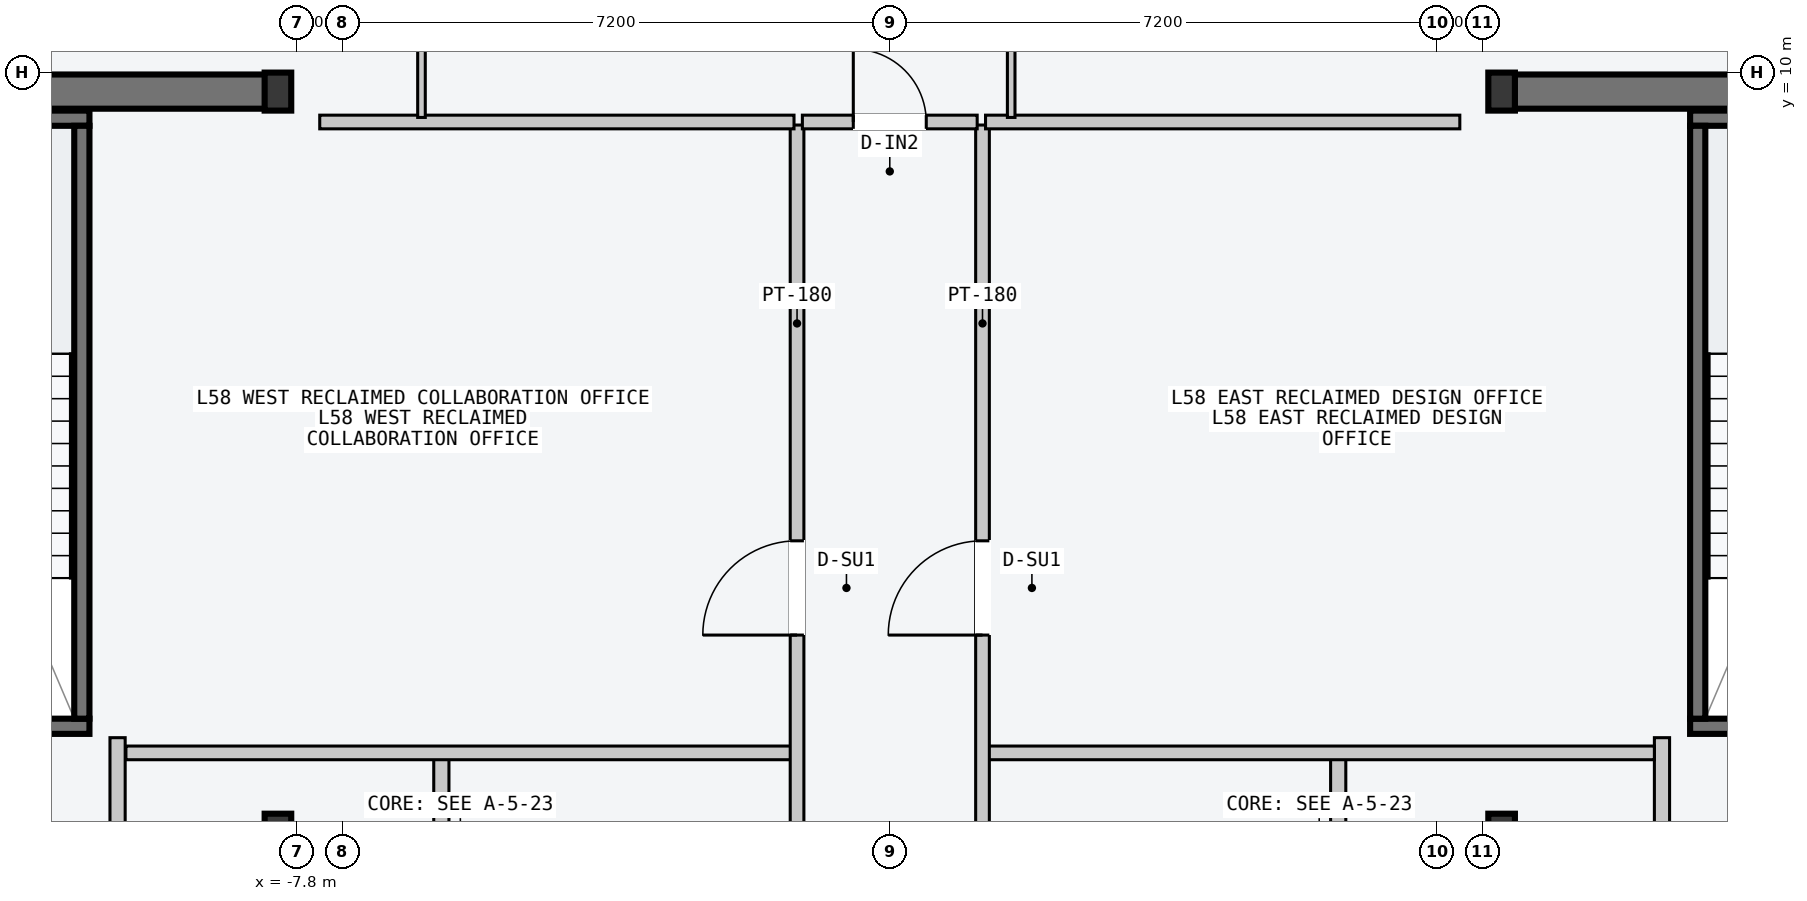
"""IFC4 building model, lengths in metres.
Left out: names, types, materials, properties, quantities, classifications, styles, units other than length and angle.
Written with IfcOpenShell. Run it as: python <this file> out.ifc"""

import sys

from ifc_helpers import new_model, si_unit, direction, frame, frame_2d, origin, origin_2d, place, context, subcontext, project, spatial, rectangle, i_section, extrude, element, fill, save


model = new_model("IFC4")
c1 = context("Model", 3, precision=1e-05, world=origin(), true_north=direction((0.0, 1.0)))
c2 = subcontext(c1, "Body", "Model", "MODEL_VIEW")
j1 = project(units=[si_unit("LENGTHUNIT", "METRE"), si_unit("PLANEANGLEUNIT", "RADIAN")], contexts=[c1])
p1 = place(None, origin())
s1 = spatial("IfcSite", under=j1, at=p1, CompositionType="ELEMENT")
p2 = place(p1, origin())
s2 = spatial("IfcBuilding", under=s1, at=p2, CompositionType="ELEMENT")
p3 = place(p2, frame((0.0, 0.0, 222.0)))
s3 = spatial("IfcBuildingStorey", under=s2, at=p3, CompositionType="ELEMENT", Elevation=222.0)
for number, where, z_axis, x_axis in (
    (1, (-14.53, 9.75, -0.2), (0.0, 0.0, 1.0), (1.0, 0.0, 0.0)),
    (2, (8.07, 9.75, -0.2), (0.0, 0.0, 1.0), (1.0, 0.0, 0.0)),
):
    element("IfcWall", number, at=place(p3, frame(where, z_axis=z_axis, x_axis=x_axis)), inside=s3, PredefinedType="SHEAR", context=c2, shape_type="SweptSolid", body=[
        extrude(rectangle(XDim=6.46, YDim=0.45, at=frame_2d((3.23, 0.0))), origin(), (0.0, 0.0, 1.0), 3.6),
    ])
p4 = place(p3, frame((-14.25, 1.4, -0.2), z_axis=(0.0, 0.0, 1.0), x_axis=(1.0, 0.0, 0.0)))
e3 = element("IfcWall", 3, at=p4, inside=s3, PredefinedType="SOLIDWALL", context=c2, shape_type="SweptSolid", body=[
    extrude(rectangle(XDim=3.72, YDim=0.2, at=frame_2d((1.86, 0.0))), origin(), (0.0, 0.0, 1.0), 3.6),
])
p5 = place(p4, frame((1.5, 0.0, 0.2)))
e4 = element("IfcOpeningElement", 4, at=p5, cuts=e3, PredefinedType="OPENING", context=c2, shape_type="SweptSolid", body=[
    extrude(rectangle(XDim=1.12, YDim=2.18, at=frame_2d((0.56, 1.09))), frame((0.0, 0.11, 0.0), z_axis=(0.0, -1.0, 0.0), x_axis=(1.0, 0.0, 0.0)), (0.0, 0.0, 1.0), 0.22),
])
p6 = place(p3, frame((-14.25, 9.4, -0.2), z_axis=(0.0, 0.0, 1.0), x_axis=(1.0, 0.0, 0.0)))
e5 = element("IfcWall", 5, at=p6, inside=s3, PredefinedType="SOLIDWALL", context=c2, shape_type="SweptSolid", body=[
    extrude(rectangle(XDim=3.72, YDim=0.2, at=frame_2d((1.86, 0.0))), origin(), (0.0, 0.0, 1.0), 3.6),
])
p7 = place(p3, frame((-10.63, 1.5, -0.2), z_axis=(0.0, 0.0, 1.0), x_axis=(0.0, 1.0, 0.0)))
e6 = element("IfcWall", 6, at=p7, inside=s3, PredefinedType="SOLIDWALL", context=c2, shape_type="SweptSolid", body=[
    extrude(rectangle(XDim=7.8, YDim=0.2, at=frame_2d((3.9, 0.0))), origin(), (0.0, 0.0, 1.0), 3.6),
])
p8 = place(p3, frame((10.53, 1.4, -0.2), z_axis=(0.0, 0.0, 1.0), x_axis=(1.0, 0.0, 0.0)))
e7 = element("IfcWall", 7, at=p8, inside=s3, PredefinedType="SOLIDWALL", context=c2, shape_type="SweptSolid", body=[
    extrude(rectangle(XDim=3.72, YDim=0.2, at=frame_2d((1.86, 0.0))), origin(), (0.0, 0.0, 1.0), 3.6),
])
p9 = place(p8, frame((1.5, 0.0, 0.2)))
e8 = element("IfcOpeningElement", 8, at=p9, cuts=e7, PredefinedType="OPENING", context=c2, shape_type="SweptSolid", body=[
    extrude(rectangle(XDim=1.12, YDim=2.18, at=frame_2d((0.56, 1.09))), frame((0.0, 0.11, 0.0), z_axis=(0.0, -1.0, 0.0), x_axis=(1.0, 0.0, 0.0)), (0.0, 0.0, 1.0), 0.22),
])
p10 = place(p3, frame((10.53, 9.4, -0.2), z_axis=(0.0, 0.0, 1.0), x_axis=(1.0, 0.0, 0.0)))
e9 = element("IfcWall", 9, at=p10, inside=s3, PredefinedType="SOLIDWALL", context=c2, shape_type="SweptSolid", body=[
    extrude(rectangle(XDim=3.72, YDim=0.2, at=frame_2d((1.86, 0.0))), origin(), (0.0, 0.0, 1.0), 3.6),
])
p11 = place(p3, frame((10.63, 1.5, -0.2), z_axis=(0.0, 0.0, 1.0), x_axis=(0.0, 1.0, 0.0)))
e10 = element("IfcWall", 10, at=p11, inside=s3, PredefinedType="SOLIDWALL", context=c2, shape_type="SweptSolid", body=[
    extrude(rectangle(XDim=7.8, YDim=0.2, at=frame_2d((3.9, 0.0))), origin(), (0.0, 0.0, 1.0), 3.6),
])
for number, where, z_axis, x_axis in (
    (11, (-8.05, 0.0, 0.0), (0.0, 0.0, 1.0), (1.0, 0.0, 0.0)),
    (12, (-8.05, 9.75, 0.0), (0.0, 0.0, 1.0), (1.0, 0.0, 0.0)),
    (13, (8.05, 0.0, 0.0), (0.0, 0.0, 1.0), (1.0, 0.0, 0.0)),
    (14, (8.05, 9.75, 0.0), (0.0, 0.0, 1.0), (1.0, 0.0, 0.0)),
):
    element("IfcColumn", number, at=place(p3, frame(where, z_axis=z_axis, x_axis=x_axis)), inside=s3, PredefinedType="COLUMN", context=c2, shape_type="SweptSolid", body=[
        extrude(i_section(OverallWidth=0.35, OverallDepth=0.5, WebThickness=0.02, FlangeThickness=0.032, at=origin_2d()), origin(), (0.0, 0.0, 1.0), 3.6),
    ])
p12 = place(p3, frame((-5.9, -9.45, 0.0), z_axis=(0.0, 0.0, 1.0), x_axis=(0.0, 1.0, 0.0)))
e15 = element("IfcWall", 15, at=p12, inside=s3, PredefinedType="PARTITIONING", context=c2, shape_type="SweptSolid", body=[
    extrude(rectangle(XDim=10.5, YDim=0.2, at=frame_2d((5.25, 0.0))), origin(), (0.0, 0.0, 1.0), 3.4),
])
p13 = place(p12, frame((3.9, 0.0, 0.0)))
e16 = element("IfcOpeningElement", 16, at=p13, cuts=e15, PredefinedType="OPENING", context=c2, shape_type="SweptSolid", body=[
    extrude(rectangle(XDim=1.5, YDim=2.2, at=frame_2d((0.75, 1.1))), frame((0.0, 0.11, 0.0), z_axis=(0.0, -1.0, 0.0), x_axis=(1.0, 0.0, 0.0)), (0.0, 0.0, 1.0), 0.22),
])
p14 = place(p3, frame((-10.16, -2.55, 0.0), z_axis=(0.0, 0.0, 1.0), x_axis=(0.0, 1.0, 0.0)))
e17 = element("IfcWall", 17, at=p14, inside=s3, PredefinedType="PARTITIONING", context=c2, shape_type="SweptSolid", body=[
    extrude(rectangle(XDim=3.8, YDim=0.2, at=frame_2d((1.9, 0.0))), origin(), (0.0, 0.0, 1.0), 3.4),
])
p15 = place(p14, frame((1.3, 0.0, 0.0)))
e18 = element("IfcOpeningElement", 18, at=p15, cuts=e17, PredefinedType="OPENING", context=c2, shape_type="SweptSolid", body=[
    extrude(rectangle(XDim=1.1, YDim=2.15, at=frame_2d((0.55, 1.075))), frame((0.0, 0.11, 0.0), z_axis=(0.0, -1.0, 0.0), x_axis=(1.0, 0.0, 0.0)), (0.0, 0.0, 1.0), 0.22),
])
p16 = place(p3, frame((5.9, -9.45, 0.0), z_axis=(0.0, 0.0, 1.0), x_axis=(0.0, 1.0, 0.0)))
e19 = element("IfcWall", 19, at=p16, inside=s3, PredefinedType="PARTITIONING", context=c2, shape_type="SweptSolid", body=[
    extrude(rectangle(XDim=10.5, YDim=0.2, at=frame_2d((5.25, 0.0))), origin(), (0.0, 0.0, 1.0), 3.4),
])
p17 = place(p16, frame((3.9, 0.0, 0.0)))
e20 = element("IfcOpeningElement", 20, at=p17, cuts=e19, PredefinedType="OPENING", context=c2, shape_type="SweptSolid", body=[
    extrude(rectangle(XDim=1.5, YDim=2.2, at=frame_2d((0.75, 1.1))), frame((0.0, 0.11, 0.0), z_axis=(0.0, -1.0, 0.0), x_axis=(1.0, 0.0, 0.0)), (0.0, 0.0, 1.0), 0.22),
])
p18 = place(p3, frame((10.16, -2.55, 0.0), z_axis=(0.0, 0.0, 1.0), x_axis=(0.0, 1.0, 0.0)))
e21 = element("IfcWall", 21, at=p18, inside=s3, PredefinedType="PARTITIONING", context=c2, shape_type="SweptSolid", body=[
    extrude(rectangle(XDim=3.8, YDim=0.2, at=frame_2d((1.9, 0.0))), origin(), (0.0, 0.0, 1.0), 3.4),
])
p19 = place(p18, frame((1.3, 0.0, 0.0)))
e22 = element("IfcOpeningElement", 22, at=p19, cuts=e21, PredefinedType="OPENING", context=c2, shape_type="SweptSolid", body=[
    extrude(rectangle(XDim=1.1, YDim=2.15, at=frame_2d((0.55, 1.075))), frame((0.0, 0.11, 0.0), z_axis=(0.0, -1.0, 0.0), x_axis=(1.0, 0.0, 0.0)), (0.0, 0.0, 1.0), 0.22),
])
p20 = place(p3, frame((-10.05, 1.05, 0.0), z_axis=(0.0, 0.0, 1.0), x_axis=(1.0, 0.0, 0.0)))
e23 = element("IfcWall", 23, at=p20, inside=s3, PredefinedType="PARTITIONING", context=c2, shape_type="SweptSolid", body=[
    extrude(rectangle(XDim=8.79, YDim=0.18, at=frame_2d((4.395, 0.0))), origin(), (0.0, 0.0, 1.0), 3.4),
])
p21 = place(p3, frame((-1.22, -3.5, 0.0), z_axis=(0.0, 0.0, 1.0), x_axis=(0.0, 1.0, 0.0)))
e24 = element("IfcWall", 24, at=p21, inside=s3, PredefinedType="PARTITIONING", context=c2, shape_type="SweptSolid", body=[
    extrude(rectangle(XDim=12.81, YDim=0.18, at=frame_2d((6.405, 0.0))), origin(), (0.0, 0.0, 1.0), 3.4),
])
p22 = place(p21, frame((6.1, 0.0, 0.0)))
e25 = element("IfcOpeningElement", 25, at=p22, cuts=e24, PredefinedType="OPENING", context=c2, shape_type="SweptSolid", body=[
    extrude(rectangle(XDim=1.24, YDim=2.24, at=frame_2d((0.62, 1.12))), frame((0.0, 0.1, 0.0), z_axis=(0.0, -1.0, 0.0), x_axis=(1.0, 0.0, 0.0)), (0.0, 0.0, 1.0), 0.2),
])
p23 = place(p21, frame((1.6, 0.0, 0.0)))
e26 = element("IfcOpeningElement", 26, at=p23, cuts=e24, PredefinedType="OPENING", context=c2, shape_type="SweptSolid", body=[
    extrude(rectangle(XDim=0.96, YDim=2.18, at=frame_2d((0.48, 1.09))), frame((0.0, 0.1, 0.0), z_axis=(0.0, -1.0, 0.0), x_axis=(1.0, 0.0, 0.0)), (0.0, 0.0, 1.0), 0.2),
])
p24 = place(p3, frame((-7.5, 9.35, 0.0), z_axis=(0.0, 0.0, 1.0), x_axis=(1.0, 0.0, 0.0)))
e27 = element("IfcWall", 27, at=p24, inside=s3, PredefinedType="PARTITIONING", context=c2, shape_type="SweptSolid", body=[
    extrude(rectangle(XDim=6.24, YDim=0.18, at=frame_2d((3.12, 0.0))), origin(), (0.0, 0.0, 1.0), 3.4),
])
p25 = place(p3, frame((1.26, 1.05, 0.0), z_axis=(0.0, 0.0, 1.0), x_axis=(1.0, 0.0, 0.0)))
e28 = element("IfcWall", 28, at=p25, inside=s3, PredefinedType="PARTITIONING", context=c2, shape_type="SweptSolid", body=[
    extrude(rectangle(XDim=8.8, YDim=0.18, at=frame_2d((4.4, 0.0))), origin(), (0.0, 0.0, 1.0), 3.4),
])
p26 = place(p3, frame((1.22, -3.5, 0.0), z_axis=(0.0, 0.0, 1.0), x_axis=(0.0, 1.0, 0.0)))
e29 = element("IfcWall", 29, at=p26, inside=s3, PredefinedType="PARTITIONING", context=c2, shape_type="SweptSolid", body=[
    extrude(rectangle(XDim=12.81, YDim=0.18, at=frame_2d((6.405, 0.0))), origin(), (0.0, 0.0, 1.0), 3.4),
])
p27 = place(p26, frame((6.1, 0.0, 0.0)))
e30 = element("IfcOpeningElement", 30, at=p27, cuts=e29, PredefinedType="OPENING", context=c2, shape_type="SweptSolid", body=[
    extrude(rectangle(XDim=1.24, YDim=2.24, at=frame_2d((0.62, 1.12))), frame((0.0, 0.1, 0.0), z_axis=(0.0, -1.0, 0.0), x_axis=(1.0, 0.0, 0.0)), (0.0, 0.0, 1.0), 0.2),
])
p28 = place(p26, frame((1.6, 0.0, 0.0)))
e31 = element("IfcOpeningElement", 31, at=p28, cuts=e29, PredefinedType="OPENING", context=c2, shape_type="SweptSolid", body=[
    extrude(rectangle(XDim=0.96, YDim=2.18, at=frame_2d((0.48, 1.09))), frame((0.0, 0.1, 0.0), z_axis=(0.0, -1.0, 0.0), x_axis=(1.0, 0.0, 0.0)), (0.0, 0.0, 1.0), 0.2),
])
p29 = place(p3, frame((1.26, 9.35, 0.0), z_axis=(0.0, 0.0, 1.0), x_axis=(1.0, 0.0, 0.0)))
e32 = element("IfcWall", 32, at=p29, inside=s3, PredefinedType="PARTITIONING", context=c2, shape_type="SweptSolid", body=[
    extrude(rectangle(XDim=6.24, YDim=0.18, at=frame_2d((3.12, 0.0))), origin(), (0.0, 0.0, 1.0), 3.4),
])
p30 = place(p3, frame((-6.161, 9.41, 0.0), z_axis=(0.0, 0.0, 1.0), x_axis=(0.0, 1.0, 0.0)))
e33 = element("IfcWall", 33, at=p30, inside=s3, PredefinedType="PARTITIONING", context=c2, shape_type="SweptSolid", body=[
    extrude(rectangle(XDim=8.15, YDim=0.1, at=frame_2d((4.075, 0.0))), origin(), (0.0, 0.0, 1.0), 3.4),
])
p31 = place(p30, frame((1.15, 0.0, 0.0)))
e34 = element("IfcOpeningElement", 34, at=p31, cuts=e33, PredefinedType="OPENING", context=c2, shape_type="SweptSolid", body=[
    extrude(rectangle(XDim=0.96, YDim=2.18, at=frame_2d((0.48, 1.09))), frame((0.0, 0.06, 0.0), z_axis=(0.0, -1.0, 0.0), x_axis=(1.0, 0.0, 0.0)), (0.0, 0.0, 1.0), 0.12),
])
p32 = place(p3, frame((1.597, 9.41, 0.0), z_axis=(0.0, 0.0, 1.0), x_axis=(0.0, 1.0, 0.0)))
e35 = element("IfcWall", 35, at=p32, inside=s3, PredefinedType="PARTITIONING", context=c2, shape_type="SweptSolid", body=[
    extrude(rectangle(XDim=7.14, YDim=0.1, at=frame_2d((3.57, 0.0))), origin(), (0.0, 0.0, 1.0), 3.4),
])
p33 = place(p32, frame((1.15, 0.0, 0.0)))
e36 = element("IfcOpeningElement", 36, at=p33, cuts=e35, PredefinedType="OPENING", context=c2, shape_type="SweptSolid", body=[
    extrude(rectangle(XDim=0.96, YDim=2.18, at=frame_2d((0.48, 1.09))), frame((0.0, 0.06, 0.0), z_axis=(0.0, -1.0, 0.0), x_axis=(1.0, 0.0, 0.0)), (0.0, 0.0, 1.0), 0.12),
])
p34 = place(p3, frame((-1.15, 9.35, 0.0), z_axis=(0.0, 0.0, 1.0), x_axis=(1.0, 0.0, 0.0)))
e37 = element("IfcWall", 37, at=p34, inside=s3, PredefinedType="PARTITIONING", context=c2, shape_type="SweptSolid", body=[
    extrude(rectangle(XDim=2.3, YDim=0.18, at=frame_2d((1.15, 0.0))), origin(), (0.0, 0.0, 1.0), 3.4),
])
p35 = place(p34, frame((0.67, 0.0, 0.0)))
e38 = element("IfcOpeningElement", 38, at=p35, cuts=e37, PredefinedType="OPENING", context=c2, shape_type="SweptSolid", body=[
    extrude(rectangle(XDim=0.96, YDim=2.18, at=frame_2d((0.48, 1.09))), frame((0.0, 0.1, 0.0), z_axis=(0.0, -1.0, 0.0), x_axis=(1.0, 0.0, 0.0)), (0.0, 0.0, 1.0), 0.2),
])
p36 = place(p22, origin())
e39 = element("IfcDoor", 39, at=p36, inside=s3, OperationType="SINGLE_SWING_LEFT", PredefinedType="DOOR", context=c2, shape_type="SweptSolid", body=[
    extrude(rectangle(XDim=1.24, YDim=2.24, at=frame_2d((0.62, 1.12))), frame((0.0, 0.025, 0.0), z_axis=(0.0, -1.0, 0.0), x_axis=(1.0, 0.0, 0.0)), (0.0, 0.0, 1.0), 0.05),
])
fill(e25, e39)
p37 = place(p27, origin())
e40 = element("IfcDoor", 40, at=p37, inside=s3, OperationType="SINGLE_SWING_LEFT", PredefinedType="DOOR", context=c2, shape_type="SweptSolid", body=[
    extrude(rectangle(XDim=1.24, YDim=2.24, at=frame_2d((0.62, 1.12))), frame((0.0, 0.025, 0.0), z_axis=(0.0, -1.0, 0.0), x_axis=(1.0, 0.0, 0.0)), (0.0, 0.0, 1.0), 0.05),
])
fill(e30, e40)
p38 = place(p35, origin())
e41 = element("IfcDoor", 41, at=p38, inside=s3, OperationType="SINGLE_SWING_LEFT", PredefinedType="DOOR", context=c2, shape_type="SweptSolid", body=[
    extrude(rectangle(XDim=0.96, YDim=2.18, at=frame_2d((0.48, 1.09))), frame((0.0, 0.025, 0.0), z_axis=(0.0, -1.0, 0.0), x_axis=(1.0, 0.0, 0.0)), (0.0, 0.0, 1.0), 0.05),
])
fill(e38, e41)
save(model, sys.argv[1])
